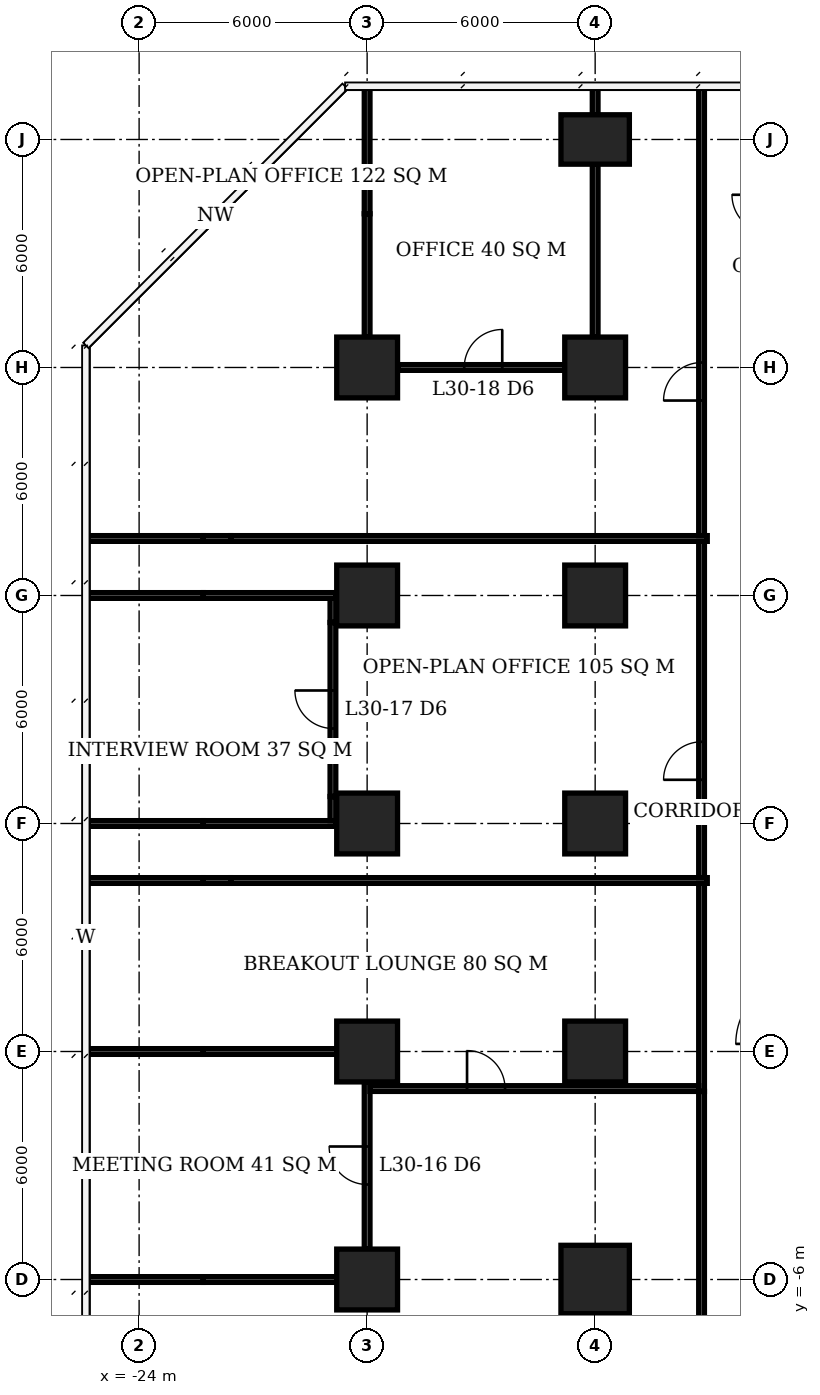
"""IFC4 building model, lengths in metres.
Left out: names, types, materials, properties, quantities, classifications, styles, units other than length and angle.
Written with IfcOpenShell. Run it as: python <this file> out.ifc"""

import sys

from ifc_helpers import new_model, si_unit, direction, frame, frame_2d, origin, origin_2d, place, context, subcontext, project, spatial, rectangle, extrude, element, fill, save


model = new_model("IFC4")
c1 = context("Model", 3, precision=1e-05, world=origin(), true_north=direction((0.0, 1.0)))
c2 = subcontext(c1, "Body", "Model", "MODEL_VIEW")
j1 = project(units=[si_unit("LENGTHUNIT", "METRE"), si_unit("PLANEANGLEUNIT", "RADIAN")], contexts=[c1])
p1 = place(None, origin())
s1 = spatial("IfcSite", under=j1, at=p1, CompositionType="ELEMENT")
p2 = place(p1, origin())
s2 = spatial("IfcBuilding", under=s1, at=p2, CompositionType="ELEMENT")
p3 = place(p2, frame((0.0, 0.0, 125.0)))
s3 = spatial("IfcBuildingStorey", under=s2, at=p3, CompositionType="ELEMENT", Elevation=125.0)
for number, where, z_axis, x_axis in (
    (1, (-18.0, -6.0, 0.0), (0.0, 0.0, 1.0), (1.0, 0.0, 0.0)),
    (2, (-18.0, 0.0, 0.0), (0.0, 0.0, 1.0), (1.0, 0.0, 0.0)),
    (3, (-18.0, 6.0, 0.0), (0.0, 0.0, 1.0), (1.0, 0.0, 0.0)),
    (4, (-18.0, 12.0, 0.0), (0.0, 0.0, 1.0), (1.0, 0.0, 0.0)),
    (5, (-18.0, 18.0, 0.0), (0.0, 0.0, 1.0), (1.0, 0.0, 0.0)),
):
    element("IfcColumn", number, at=place(p3, frame(where, z_axis=z_axis, x_axis=x_axis)), inside=s3, PredefinedType="COLUMN", context=c2, shape_type="SweptSolid", body=[
        extrude(rectangle(XDim=1.6, YDim=1.6, at=origin_2d()), origin(), (0.0, 0.0, 1.0), 3.9),
    ])
p4 = place(p3, frame((-12.0, -6.0, 0.0), z_axis=(0.0, 0.0, 1.0), x_axis=(1.0, 0.0, 0.0)))
e6 = element("IfcColumn", 6, at=p4, inside=s3, PredefinedType="COLUMN", context=c2, shape_type="SweptSolid", body=[
    extrude(rectangle(XDim=1.8, YDim=1.8, at=origin_2d()), origin(), (0.0, 0.0, 1.0), 3.9),
])
for number, where, z_axis, x_axis in (
    (7, (-12.0, 0.0, 0.0), (0.0, 0.0, 1.0), (1.0, 0.0, 0.0)),
    (8, (-12.0, 6.0, 0.0), (0.0, 0.0, 1.0), (1.0, 0.0, 0.0)),
    (9, (-12.0, 12.0, 0.0), (0.0, 0.0, 1.0), (1.0, 0.0, 0.0)),
    (10, (-12.0, 18.0, 0.0), (0.0, 0.0, 1.0), (1.0, 0.0, 0.0)),
):
    element("IfcColumn", number, at=place(p3, frame(where, z_axis=z_axis, x_axis=x_axis)), inside=s3, PredefinedType="COLUMN", context=c2, shape_type="SweptSolid", body=[
        extrude(rectangle(XDim=1.6, YDim=1.6, at=origin_2d()), origin(), (0.0, 0.0, 1.0), 3.9),
    ])
p5 = place(p3, frame((-12.0, 24.0, 0.0), z_axis=(0.0, 0.0, 1.0), x_axis=(1.0, 0.0, 0.0)))
e11 = element("IfcColumn", 11, at=p5, inside=s3, PredefinedType="COLUMN", context=c2, shape_type="SweptSolid", body=[
    extrude(rectangle(XDim=1.8, YDim=1.3, at=origin_2d()), origin(), (0.0, 0.0, 1.0), 3.9),
])
p6 = place(p3, frame((-25.4, -6.0, 0.0), z_axis=(0.0, 0.0, 1.0), x_axis=(1.0, 0.0, 0.0)))
e12 = element("IfcWall", 12, at=p6, inside=s3, PredefinedType="PARTITIONING", context=c2, shape_type="SweptSolid", body=[
    extrude(rectangle(XDim=3.09, YDim=0.15, at=frame_2d((1.545, 0.0))), origin(), (0.0, 0.0, 1.0), 3.65),
])
p7 = place(p3, frame((-22.31, -6.0, 0.0), z_axis=(0.0, 0.0, 1.0), x_axis=(1.0, 0.0, 0.0)))
e13 = element("IfcWall", 13, at=p7, inside=s3, PredefinedType="PARTITIONING", context=c2, shape_type="SweptSolid", body=[
    extrude(rectangle(XDim=3.51, YDim=0.15, at=frame_2d((1.755, 0.0))), origin(), (0.0, 0.0, 1.0), 2.65),
])
p8 = place(p3, frame((-25.35, 0.0, 0.0), z_axis=(0.0, 0.0, 1.0), x_axis=(1.0, 0.0, 0.0)))
e14 = element("IfcWall", 14, at=p8, inside=s3, PredefinedType="PARTITIONING", context=c2, shape_type="SweptSolid", body=[
    extrude(rectangle(XDim=3.04, YDim=0.15, at=frame_2d((1.52, 0.0))), origin(), (0.0, 0.0, 1.0), 3.65),
])
p9 = place(p3, frame((-22.31, 0.0, 0.0), z_axis=(0.0, 0.0, 1.0), x_axis=(1.0, 0.0, 0.0)))
e15 = element("IfcWall", 15, at=p9, inside=s3, PredefinedType="PARTITIONING", context=c2, shape_type="SweptSolid", body=[
    extrude(rectangle(XDim=3.51, YDim=0.15, at=frame_2d((1.755, 0.0))), origin(), (0.0, 0.0, 1.0), 2.65),
])
p10 = place(p3, frame((-25.35, 6.0, 0.0), z_axis=(0.0, 0.0, 1.0), x_axis=(1.0, 0.0, 0.0)))
e16 = element("IfcWall", 16, at=p10, inside=s3, PredefinedType="PARTITIONING", context=c2, shape_type="SweptSolid", body=[
    extrude(rectangle(XDim=3.04, YDim=0.15, at=frame_2d((1.52, 0.0))), origin(), (0.0, 0.0, 1.0), 3.65),
])
p11 = place(p3, frame((-22.31, 6.0, 0.0), z_axis=(0.0, 0.0, 1.0), x_axis=(1.0, 0.0, 0.0)))
e17 = element("IfcWall", 17, at=p11, inside=s3, PredefinedType="PARTITIONING", context=c2, shape_type="SweptSolid", body=[
    extrude(rectangle(XDim=3.485, YDim=0.15, at=frame_2d((1.743, 0.0))), origin(), (0.0, 0.0, 1.0), 2.65),
])
p12 = place(p3, frame((-25.4, 12.0, 0.0), z_axis=(0.0, 0.0, 1.0), x_axis=(1.0, 0.0, 0.0)))
e18 = element("IfcWall", 18, at=p12, inside=s3, PredefinedType="PARTITIONING", context=c2, shape_type="SweptSolid", body=[
    extrude(rectangle(XDim=3.09, YDim=0.15, at=frame_2d((1.545, 0.0))), origin(), (0.0, 0.0, 1.0), 3.65),
])
p13 = place(p3, frame((-22.31, 12.0, 0.0), z_axis=(0.0, 0.0, 1.0), x_axis=(1.0, 0.0, 0.0)))
e19 = element("IfcWall", 19, at=p13, inside=s3, PredefinedType="PARTITIONING", context=c2, shape_type="SweptSolid", body=[
    extrude(rectangle(XDim=3.485, YDim=0.15, at=frame_2d((1.743, 0.0))), origin(), (0.0, 0.0, 1.0), 2.65),
])
p14 = place(p3, frame((-17.19, 18.0, 0.0), z_axis=(0.0, 0.0, 1.0), x_axis=(1.0, 0.0, 0.0)))
e20 = element("IfcWall", 20, at=p14, inside=s3, PredefinedType="PARTITIONING", context=c2, shape_type="SweptSolid", body=[
    extrude(rectangle(XDim=4.39, YDim=0.15, at=frame_2d((2.195, 0.0))), origin(), (0.0, 0.0, 1.0), 3.65),
])
p15 = place(p14, frame((1.745, 0.0, 0.0)))
e21 = element("IfcOpeningElement", 21, at=p15, cuts=e20, PredefinedType="OPENING", context=c2, shape_type="SweptSolid", body=[
    extrude(rectangle(XDim=1.0, YDim=2.1, at=frame_2d((0.5, 1.05))), frame((0.0, 0.085, 0.0), z_axis=(0.0, -1.0, 0.0), x_axis=(1.0, 0.0, 0.0)), (0.0, 0.0, 1.0), 0.17),
])
p16 = place(p3, frame((-18.9, 6.075, 0.0), z_axis=(0.0, 0.0, 1.0), x_axis=(0.0, 1.0, 0.0)))
e22 = element("IfcWall", 22, at=p16, inside=s3, PredefinedType="PARTITIONING", context=c2, shape_type="SweptSolid", body=[
    extrude(rectangle(XDim=0.635, YDim=0.15, at=frame_2d((0.317, 0.0))), origin(), (0.0, 0.0, 1.0), 2.65),
])
p17 = place(p3, frame((-18.9, 6.71, 0.0), z_axis=(0.0, 0.0, 1.0), x_axis=(0.0, 1.0, 0.0)))
e23 = element("IfcWall", 23, at=p17, inside=s3, PredefinedType="PARTITIONING", context=c2, shape_type="SweptSolid", body=[
    extrude(rectangle(XDim=4.58, YDim=0.15, at=frame_2d((2.29, 0.0))), origin(), (0.0, 0.0, 1.0), 3.65),
])
p18 = place(p17, frame((1.79, 0.0, 0.0)))
e24 = element("IfcOpeningElement", 24, at=p18, cuts=e23, PredefinedType="OPENING", context=c2, shape_type="SweptSolid", body=[
    extrude(rectangle(XDim=1.0, YDim=2.1, at=frame_2d((0.5, 1.05))), frame((0.0, 0.085, 0.0), z_axis=(0.0, -1.0, 0.0), x_axis=(1.0, 0.0, 0.0)), (0.0, 0.0, 1.0), 0.17),
])
p19 = place(p3, frame((-18.9, 11.29, 0.0), z_axis=(0.0, 0.0, 1.0), x_axis=(0.0, 1.0, 0.0)))
e25 = element("IfcWall", 25, at=p19, inside=s3, PredefinedType="PARTITIONING", context=c2, shape_type="SweptSolid", body=[
    extrude(rectangle(XDim=0.635, YDim=0.15, at=frame_2d((0.317, 0.0))), origin(), (0.0, 0.0, 1.0), 2.65),
])
p20 = place(p3, frame((-18.0, -5.2, 0.0), z_axis=(0.0, 0.0, 1.0), x_axis=(0.0, 1.0, 0.0)))
e26 = element("IfcWall", 26, at=p20, inside=s3, PredefinedType="PARTITIONING", context=c2, shape_type="SweptSolid", body=[
    extrude(rectangle(XDim=4.4, YDim=0.15, at=frame_2d((2.2, 0.0))), origin(), (0.0, 0.0, 1.0), 3.65),
])
p21 = place(p20, frame((1.7, 0.0, 0.0)))
e27 = element("IfcOpeningElement", 27, at=p21, cuts=e26, PredefinedType="OPENING", context=c2, shape_type="SweptSolid", body=[
    extrude(rectangle(XDim=1.0, YDim=2.1, at=frame_2d((0.5, 1.05))), frame((0.0, 0.085, 0.0), z_axis=(0.0, -1.0, 0.0), x_axis=(1.0, 0.0, 0.0)), (0.0, 0.0, 1.0), 0.17),
])
p22 = place(p3, frame((-18.0, 18.8, 0.0), z_axis=(0.0, 0.0, 1.0), x_axis=(0.0, 1.0, 0.0)))
e28 = element("IfcWall", 28, at=p22, inside=s3, PredefinedType="PARTITIONING", context=c2, shape_type="SweptSolid", body=[
    extrude(rectangle(XDim=3.245, YDim=0.15, at=frame_2d((1.623, 0.0))), origin(), (0.0, 0.0, 1.0), 2.65),
])
p23 = place(p3, frame((-18.0, 22.045, 0.0), z_axis=(0.0, 0.0, 1.0), x_axis=(0.0, 1.0, 0.0)))
e29 = element("IfcWall", 29, at=p23, inside=s3, PredefinedType="PARTITIONING", context=c2, shape_type="SweptSolid", body=[
    extrude(rectangle(XDim=3.355, YDim=0.15, at=frame_2d((1.677, 0.0))), origin(), (0.0, 0.0, 1.0), 3.65),
])
p24 = place(p3, frame((-12.0, 18.8, 0.0), z_axis=(0.0, 0.0, 1.0), x_axis=(0.0, 1.0, 0.0)))
e30 = element("IfcWall", 30, at=p24, inside=s3, PredefinedType="PARTITIONING", context=c2, shape_type="SweptSolid", body=[
    extrude(rectangle(XDim=4.55, YDim=0.15, at=frame_2d((2.275, 0.0))), origin(), (0.0, 0.0, 1.0), 3.65),
])
p25 = place(p3, frame((-12.0, 24.65, 0.0), z_axis=(0.0, 0.0, 1.0), x_axis=(0.0, 1.0, 0.0)))
e31 = element("IfcWall", 31, at=p25, inside=s3, PredefinedType="PARTITIONING", context=c2, shape_type="SweptSolid", body=[
    extrude(rectangle(XDim=0.75, YDim=0.15, at=frame_2d((0.375, 0.0))), origin(), (0.0, 0.0, 1.0), 3.65),
])
p26 = place(p3, frame((-25.4, 4.5, 0.0), z_axis=(0.0, 0.0, 1.0), x_axis=(1.0, 0.0, 0.0)))
e32 = element("IfcWall", 32, at=p26, inside=s3, PredefinedType="PARTITIONING", context=c2, shape_type="SweptSolid", body=[
    extrude(rectangle(XDim=3.09, YDim=0.15, at=frame_2d((1.545, 0.0))), origin(), (0.0, 0.0, 1.0), 3.65),
])
p27 = place(p3, frame((-22.31, 4.5, 0.0), z_axis=(0.0, 0.0, 1.0), x_axis=(1.0, 0.0, 0.0)))
e33 = element("IfcWall", 33, at=p27, inside=s3, PredefinedType="PARTITIONING", context=c2, shape_type="SweptSolid", body=[
    extrude(rectangle(XDim=0.72, YDim=0.15, at=frame_2d((0.36, 0.0))), origin(), (0.0, 0.0, 1.0), 2.65),
])
p28 = place(p3, frame((-21.59, 4.5, 0.0), z_axis=(0.0, 0.0, 1.0), x_axis=(1.0, 0.0, 0.0)))
e34 = element("IfcWall", 34, at=p28, inside=s3, PredefinedType="PARTITIONING", context=c2, shape_type="SweptSolid", body=[
    extrude(rectangle(XDim=12.54, YDim=0.15, at=frame_2d((6.27, 0.0))), origin(), (0.0, 0.0, 1.0), 3.65),
])
p29 = place(p3, frame((-25.4, 13.5, 0.0), z_axis=(0.0, 0.0, 1.0), x_axis=(1.0, 0.0, 0.0)))
e35 = element("IfcWall", 35, at=p29, inside=s3, PredefinedType="PARTITIONING", context=c2, shape_type="SweptSolid", body=[
    extrude(rectangle(XDim=3.09, YDim=0.15, at=frame_2d((1.545, 0.0))), origin(), (0.0, 0.0, 1.0), 3.65),
])
p30 = place(p3, frame((-22.31, 13.5, 0.0), z_axis=(0.0, 0.0, 1.0), x_axis=(1.0, 0.0, 0.0)))
e36 = element("IfcWall", 36, at=p30, inside=s3, PredefinedType="PARTITIONING", context=c2, shape_type="SweptSolid", body=[
    extrude(rectangle(XDim=0.72, YDim=0.15, at=frame_2d((0.36, 0.0))), origin(), (0.0, 0.0, 1.0), 2.65),
])
p31 = place(p3, frame((-21.59, 13.5, 0.0), z_axis=(0.0, 0.0, 1.0), x_axis=(1.0, 0.0, 0.0)))
e37 = element("IfcWall", 37, at=p31, inside=s3, PredefinedType="PARTITIONING", context=c2, shape_type="SweptSolid", body=[
    extrude(rectangle(XDim=12.54, YDim=0.15, at=frame_2d((6.27, 0.0))), origin(), (0.0, 0.0, 1.0), 3.65),
])
p32 = place(p3, frame((-17.925, -0.975, 0.0), z_axis=(0.0, 0.0, 1.0), x_axis=(1.0, 0.0, 0.0)))
e38 = element("IfcWall", 38, at=p32, inside=s3, PredefinedType="PARTITIONING", context=c2, shape_type="SweptSolid", body=[
    extrude(rectangle(XDim=8.65, YDim=0.15, at=frame_2d((4.325, 0.0))), origin(), (0.0, 0.0, 1.0), 3.65),
])
p33 = place(p32, frame((2.554, 0.0, 0.0)))
e39 = element("IfcOpeningElement", 39, at=p33, cuts=e38, PredefinedType="OPENING", context=c2, shape_type="SweptSolid", body=[
    extrude(rectangle(XDim=1.0, YDim=2.1, at=frame_2d((0.5, 1.05))), frame((0.0, 0.085, 0.0), z_axis=(0.0, -1.0, 0.0), x_axis=(1.0, 0.0, 0.0)), (0.0, 0.0, 1.0), 0.17),
])
p34 = place(p3, frame((-9.2, -13.125, 0.0), z_axis=(0.0, 0.0, 1.0), x_axis=(0.0, 1.0, 0.0)))
e40 = element("IfcWall", 40, at=p34, inside=s3, PredefinedType="PARTITIONING", context=c2, shape_type="SweptSolid", body=[
    extrude(rectangle(XDim=12.075, YDim=0.15, at=frame_2d((6.038, 0.0))), origin(), (0.0, 0.0, 1.0), 3.65),
])
p35 = place(p34, frame((3.122, 0.0, 0.0)))
e41 = element("IfcOpeningElement", 41, at=p35, cuts=e40, PredefinedType="OPENING", context=c2, shape_type="SweptSolid", body=[
    extrude(rectangle(XDim=1.0, YDim=2.1, at=frame_2d((0.5, 1.05))), frame((0.0, 0.085, 0.0), z_axis=(0.0, -1.0, 0.0), x_axis=(1.0, 0.0, 0.0)), (0.0, 0.0, 1.0), 0.17),
])
p36 = place(p3, frame((-9.2, -1.05, 0.0), z_axis=(0.0, 0.0, 1.0), x_axis=(0.0, 1.0, 0.0)))
e42 = element("IfcWall", 42, at=p36, inside=s3, PredefinedType="PARTITIONING", context=c2, shape_type="SweptSolid", body=[
    extrude(rectangle(XDim=5.475, YDim=0.15, at=frame_2d((2.738, 0.0))), origin(), (0.0, 0.0, 1.0), 3.65),
])
p37 = place(p3, frame((-9.2, 4.575, 0.0), z_axis=(0.0, 0.0, 1.0), x_axis=(0.0, 1.0, 0.0)))
e43 = element("IfcWall", 43, at=p37, inside=s3, PredefinedType="PARTITIONING", context=c2, shape_type="SweptSolid", body=[
    extrude(rectangle(XDim=8.85, YDim=0.15, at=frame_2d((4.425, 0.0))), origin(), (0.0, 0.0, 1.0), 3.65),
])
p38 = place(p37, frame((2.575, 0.0, 0.0)))
e44 = element("IfcOpeningElement", 44, at=p38, cuts=e43, PredefinedType="OPENING", context=c2, shape_type="SweptSolid", body=[
    extrude(rectangle(XDim=1.0, YDim=2.1, at=frame_2d((0.5, 1.05))), frame((0.0, 0.085, 0.0), z_axis=(0.0, -1.0, 0.0), x_axis=(1.0, 0.0, 0.0)), (0.0, 0.0, 1.0), 0.17),
])
p39 = place(p3, frame((-9.2, 13.575, 0.0), z_axis=(0.0, 0.0, 1.0), x_axis=(0.0, 1.0, 0.0)))
e45 = element("IfcWall", 45, at=p39, inside=s3, PredefinedType="PARTITIONING", context=c2, shape_type="SweptSolid", body=[
    extrude(rectangle(XDim=11.775, YDim=0.15, at=frame_2d((5.888, 0.0))), origin(), (0.0, 0.0, 1.0), 3.65),
])
p40 = place(p39, frame((3.555, 0.0, 0.0)))
e46 = element("IfcOpeningElement", 46, at=p40, cuts=e45, PredefinedType="OPENING", context=c2, shape_type="SweptSolid", body=[
    extrude(rectangle(XDim=1.0, YDim=2.1, at=frame_2d((0.5, 1.05))), frame((0.0, 0.085, 0.0), z_axis=(0.0, -1.0, 0.0), x_axis=(1.0, 0.0, 0.0)), (0.0, 0.0, 1.0), 0.17),
])
p41 = place(p21, origin())
e47 = element("IfcDoor", 47, at=p41, inside=s3, OperationType="SINGLE_SWING_RIGHT", PredefinedType="DOOR", context=c2, shape_type="SweptSolid", body=[
    extrude(rectangle(XDim=1.0, YDim=2.1, at=frame_2d((0.5, 1.05))), frame((0.0, 0.025, 0.0), z_axis=(0.0, -1.0, 0.0), x_axis=(1.0, 0.0, 0.0)), (0.0, 0.0, 1.0), 0.05),
])
fill(e27, e47)
p42 = place(p18, origin())
e48 = element("IfcDoor", 48, at=p42, inside=s3, OperationType="SINGLE_SWING_RIGHT", PredefinedType="DOOR", context=c2, shape_type="SweptSolid", body=[
    extrude(rectangle(XDim=1.0, YDim=2.1, at=frame_2d((0.5, 1.05))), frame((0.0, 0.025, 0.0), z_axis=(0.0, -1.0, 0.0), x_axis=(1.0, 0.0, 0.0)), (0.0, 0.0, 1.0), 0.05),
])
fill(e24, e48)
p43 = place(p15, origin())
e49 = element("IfcDoor", 49, at=p43, inside=s3, OperationType="SINGLE_SWING_RIGHT", PredefinedType="DOOR", context=c2, shape_type="SweptSolid", body=[
    extrude(rectangle(XDim=1.0, YDim=2.1, at=frame_2d((0.5, 1.05))), frame((0.0, 0.025, 0.0), z_axis=(0.0, -1.0, 0.0), x_axis=(1.0, 0.0, 0.0)), (0.0, 0.0, 1.0), 0.05),
])
fill(e21, e49)
p44 = place(p33, origin())
e50 = element("IfcDoor", 50, at=p44, inside=s3, OperationType="SINGLE_SWING_LEFT", PredefinedType="DOOR", context=c2, shape_type="SweptSolid", body=[
    extrude(rectangle(XDim=1.0, YDim=2.1, at=frame_2d((0.5, 1.05))), frame((0.0, 0.025, 0.0), z_axis=(0.0, -1.0, 0.0), x_axis=(1.0, 0.0, 0.0)), (0.0, 0.0, 1.0), 0.05),
])
fill(e39, e50)
p45 = place(p38, origin())
e51 = element("IfcDoor", 51, at=p45, inside=s3, OperationType="SINGLE_SWING_LEFT", PredefinedType="DOOR", context=c2, shape_type="SweptSolid", body=[
    extrude(rectangle(XDim=1.0, YDim=2.1, at=frame_2d((0.5, 1.05))), frame((0.0, 0.025, 0.0), z_axis=(0.0, -1.0, 0.0), x_axis=(1.0, 0.0, 0.0)), (0.0, 0.0, 1.0), 0.05),
])
fill(e44, e51)
p46 = place(p40, origin())
e52 = element("IfcDoor", 52, at=p46, inside=s3, OperationType="SINGLE_SWING_LEFT", PredefinedType="DOOR", context=c2, shape_type="SweptSolid", body=[
    extrude(rectangle(XDim=1.0, YDim=2.1, at=frame_2d((0.5, 1.05))), frame((0.0, 0.025, 0.0), z_axis=(0.0, -1.0, 0.0), x_axis=(1.0, 0.0, 0.0)), (0.0, 0.0, 1.0), 0.05),
])
fill(e46, e52)
save(model, sys.argv[1])
